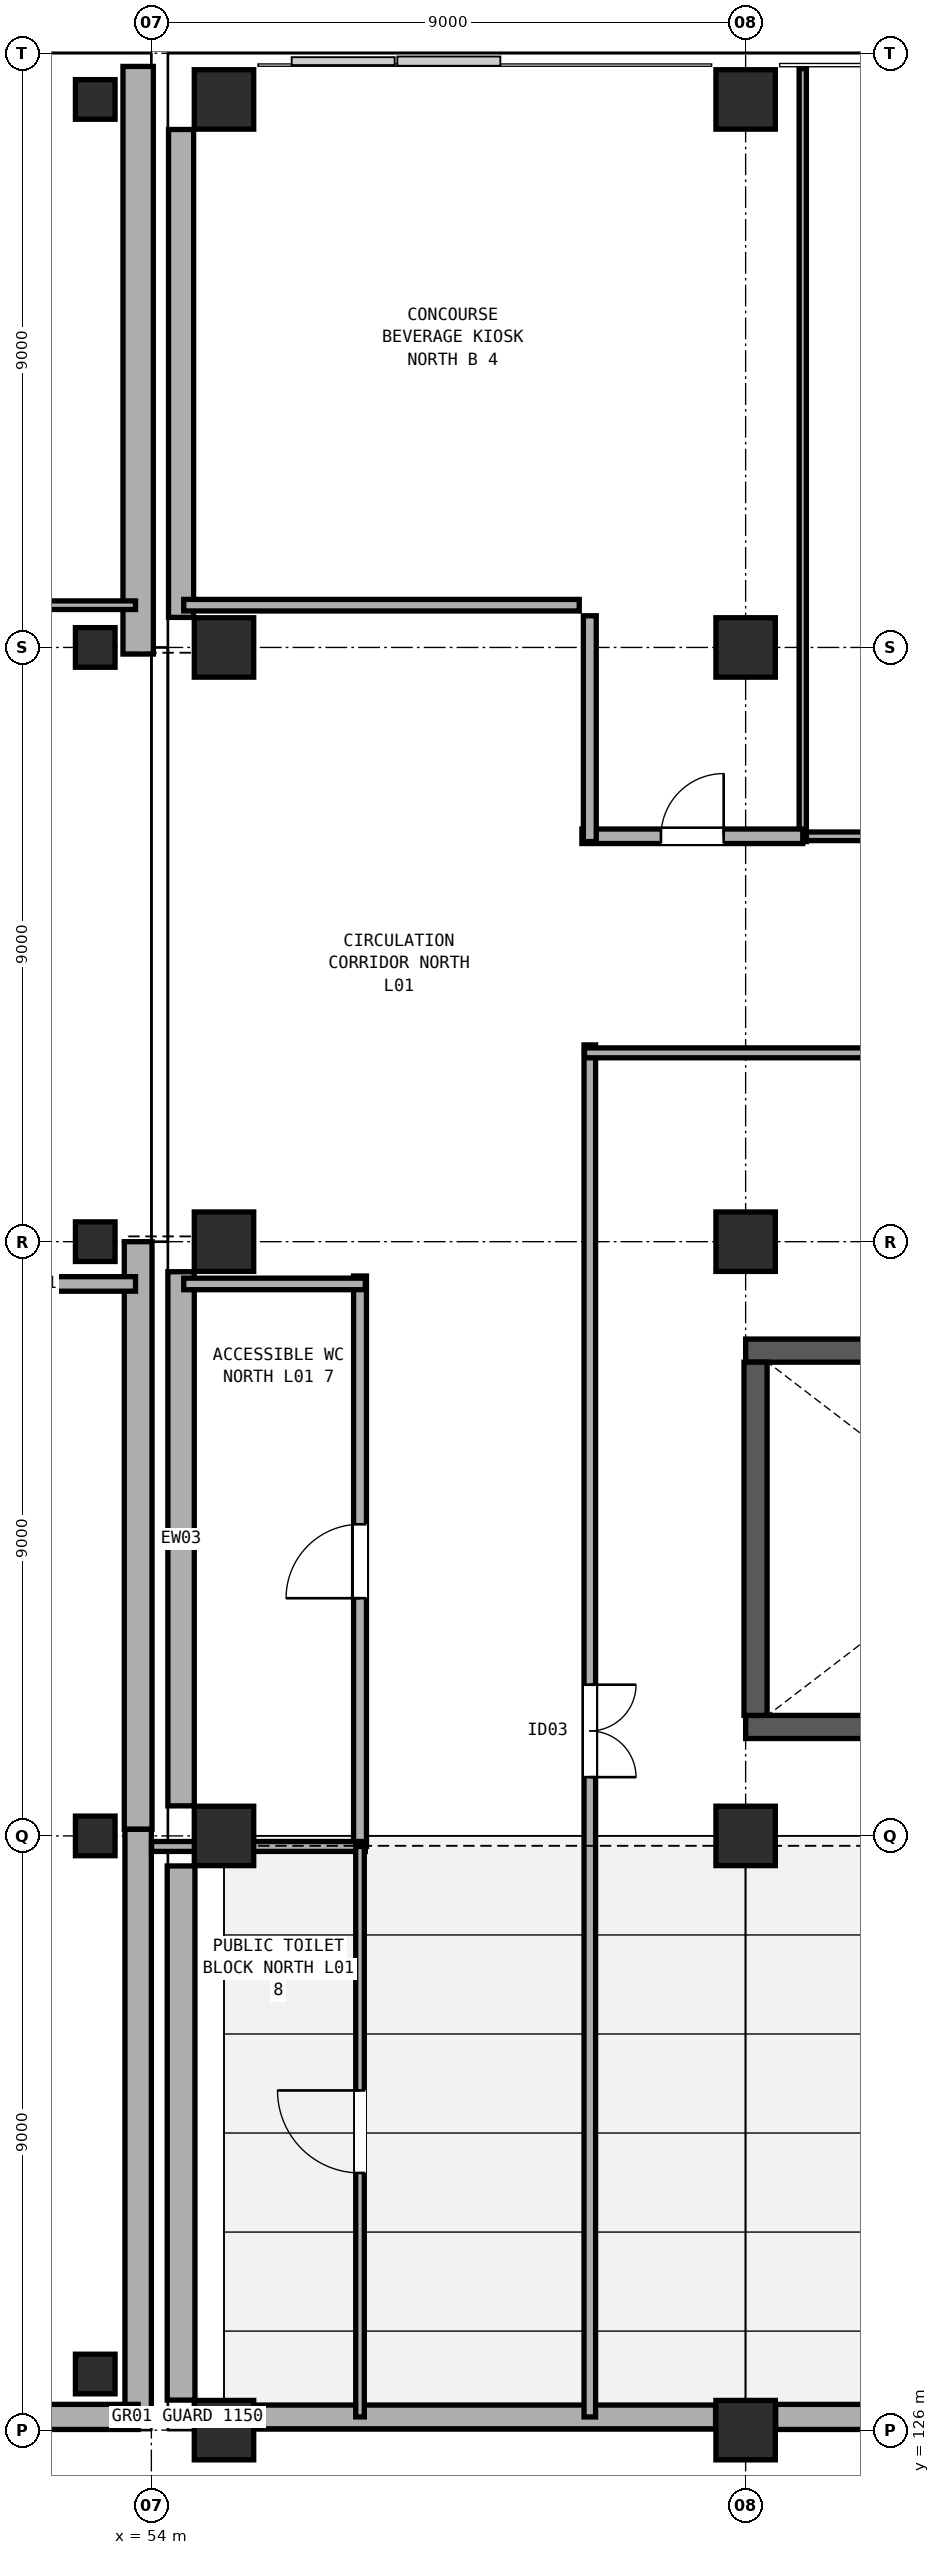
"""IFC4 building model, lengths in metres.
Left out: names, types, materials, properties, quantities, classifications, styles, units other than length and angle.
Written with IfcOpenShell. Run it as: python <this file> out.ifc"""

import sys

from ifc_helpers import new_model, si_unit, direction, frame, frame_2d, origin, origin_2d, place, context, subcontext, project, spatial, rectangle, extrude, element, fill, save


model = new_model("IFC4")
c1 = context("Model", 3, precision=1e-05, world=origin(), true_north=direction((0.0, 1.0)))
c2 = subcontext(c1, "Body", "Model", "MODEL_VIEW")
j1 = project(units=[si_unit("LENGTHUNIT", "METRE"), si_unit("PLANEANGLEUNIT", "RADIAN")], contexts=[c1])
p1 = place(None, origin())
s1 = spatial("IfcSite", under=j1, at=p1, CompositionType="ELEMENT")
p2 = place(p1, origin())
s2 = spatial("IfcBuilding", under=s1, at=p2, CompositionType="ELEMENT")
p3 = place(p2, frame((0.0, 0.0, 4.8)))
s3 = spatial("IfcBuildingStorey", under=s2, at=p3, CompositionType="ELEMENT", Elevation=4.8)
for number, where, z_axis, x_axis in (
    (1, (55.1, 126.0, 0.0), (0.0, 0.0, 1.0), (1.0, 0.0, 0.0)),
    (2, (55.1, 135.0, 0.0), (0.0, 0.0, 1.0), (1.0, 0.0, 0.0)),
    (3, (55.1, 144.0, 0.0), (0.0, 0.0, 1.0), (1.0, 0.0, 0.0)),
    (4, (55.1, 153.0, 0.0), (0.0, 0.0, 1.0), (1.0, 0.0, 0.0)),
    (5, (55.1, 161.3, 0.0), (0.0, 0.0, 1.0), (1.0, 0.0, 0.0)),
    (6, (63.0, 126.0, 0.0), (0.0, 0.0, 1.0), (1.0, 0.0, 0.0)),
    (7, (63.0, 135.0, 0.0), (0.0, 0.0, 1.0), (1.0, 0.0, 0.0)),
    (8, (63.0, 144.0, 0.0), (0.0, 0.0, 1.0), (1.0, 0.0, 0.0)),
    (9, (63.0, 153.0, 0.0), (0.0, 0.0, 1.0), (1.0, 0.0, 0.0)),
    (10, (63.0, 161.3, 0.0), (0.0, 0.0, 1.0), (1.0, 0.0, 0.0)),
):
    element("IfcColumn", number, at=place(p3, frame(where, z_axis=z_axis, x_axis=x_axis)), inside=s3, PredefinedType="COLUMN", context=c2, shape_type="SweptSolid", body=[
        extrude(rectangle(XDim=0.9, YDim=0.9, at=origin_2d()), origin(), (0.0, 0.0, 1.0), 4.8),
    ])
for number, where, z_axis, x_axis in (
    (11, (53.15, 126.85, 0.0), (0.0, 0.0, 1.0), (1.0, 0.0, 0.0)),
    (12, (53.15, 135.0, 0.0), (0.0, 0.0, 1.0), (1.0, 0.0, 0.0)),
    (13, (53.15, 144.0, 0.0), (0.0, 0.0, 1.0), (1.0, 0.0, 0.0)),
    (14, (53.15, 153.0, 0.0), (0.0, 0.0, 1.0), (1.0, 0.0, 0.0)),
    (15, (53.15, 161.3, 0.0), (0.0, 0.0, 1.0), (1.0, 0.0, 0.0)),
):
    element("IfcColumn", number, at=place(p3, frame(where, z_axis=z_axis, x_axis=x_axis)), inside=s3, PredefinedType="COLUMN", context=c2, shape_type="SweptSolid", body=[
        extrude(rectangle(XDim=0.6, YDim=0.6, at=origin_2d()), origin(), (0.0, 0.0, 1.0), 4.8),
    ])
p4 = place(p3, frame((63.0, 136.65, 0.0), z_axis=(0.0, 0.0, 1.0), x_axis=(1.0, 0.0, 0.0)))
e16 = element("IfcWall", 16, at=p4, inside=s3, PredefinedType="SHEAR", context=c2, shape_type="SweptSolid", body=[
    extrude(rectangle(XDim=18.0, YDim=0.35, at=frame_2d((9.0, 0.0))), origin(), (0.0, 0.0, 1.0), 4.52),
])
p5 = place(p3, frame((81.0, 142.35, 0.0), z_axis=(0.0, 0.0, 1.0), x_axis=(-1.0, 0.0, 0.0)))
e17 = element("IfcWall", 17, at=p5, inside=s3, PredefinedType="SHEAR", context=c2, shape_type="SweptSolid", body=[
    extrude(rectangle(XDim=18.0, YDim=0.35, at=frame_2d((9.0, 0.0))), origin(), (0.0, 0.0, 1.0), 4.52),
])
p6 = place(p5, frame((4.7, 0.0, 0.0)))
e18 = element("IfcOpeningElement", 18, at=p6, cuts=e17, PredefinedType="OPENING", context=c2, shape_type="SweptSolid", body=[
    extrude(rectangle(XDim=1.9, YDim=2.25, at=frame_2d((0.95, 1.125))), frame((0.0, 0.185, 0.0), z_axis=(0.0, -1.0, 0.0), x_axis=(1.0, 0.0, 0.0)), (0.0, 0.0, 1.0), 0.37),
])
p7 = place(p3, frame((63.15, 142.175, 0.0), z_axis=(0.0, 0.0, 1.0), x_axis=(0.0, -1.0, 0.0)))
e19 = element("IfcWall", 19, at=p7, inside=s3, PredefinedType="SHEAR", context=c2, shape_type="SweptSolid", body=[
    extrude(rectangle(XDim=5.35, YDim=0.35, at=frame_2d((2.675, 0.0))), origin(), (0.0, 0.0, 1.0), 4.52),
])
p8 = place(p3, frame((54.45, 126.455, 0.0), z_axis=(0.0, 0.0, 1.0), x_axis=(0.0, 1.0, 0.0)))
e20 = element("IfcWall", 20, at=p8, inside=s3, PredefinedType="SOLIDWALL", context=c2, shape_type="SweptSolid", body=[
    extrude(rectangle(XDim=8.09, YDim=0.42, at=frame_2d((4.045, 0.0))), origin(), (0.0, 0.0, 1.0), 3.28),
])
p9 = place(p3, frame((54.45, 135.455, 0.0), z_axis=(0.0, 0.0, 1.0), x_axis=(0.0, 1.0, 0.0)))
e21 = element("IfcWall", 21, at=p9, inside=s3, PredefinedType="SOLIDWALL", context=c2, shape_type="SweptSolid", body=[
    extrude(rectangle(XDim=8.09, YDim=0.4, at=frame_2d((4.045, 0.0))), origin(), (0.0, 0.0, 1.0), 3.28),
])
p10 = place(p3, frame((54.45, 153.455, 0.0), z_axis=(0.0, 0.0, 1.0), x_axis=(0.0, 1.0, 0.0)))
e22 = element("IfcWall", 22, at=p10, inside=s3, PredefinedType="SOLIDWALL", context=c2, shape_type="SweptSolid", body=[
    extrude(rectangle(XDim=7.39, YDim=0.38, at=frame_2d((3.695, 0.0))), origin(), (0.0, 0.0, 1.0), 3.28),
])
p11 = place(p3, frame((71.545, 126.2, 0.0), z_axis=(0.0, 0.0, 1.0), x_axis=(-1.0, 0.0, 0.0)))
e23 = element("IfcWall", 23, at=p11, inside=s3, PredefinedType="SOLIDWALL", context=c2, shape_type="SweptSolid", body=[
    extrude(rectangle(XDim=8.09, YDim=0.38, at=frame_2d((4.045, 0.0))), origin(), (0.0, 0.0, 1.0), 3.28),
])
p12 = place(p3, frame((62.545, 126.2, 0.0), z_axis=(0.0, 0.0, 1.0), x_axis=(-1.0, 0.0, 0.0)))
e24 = element("IfcWall", 24, at=p12, inside=s3, PredefinedType="SOLIDWALL", context=c2, shape_type="SweptSolid", body=[
    extrude(rectangle(XDim=6.99, YDim=0.36, at=frame_2d((3.495, 0.0))), origin(), (0.0, 0.0, 1.0), 3.28),
])
p13 = place(p3, frame((45.305, 161.8, 0.0), z_axis=(0.0, 0.0, 1.0), x_axis=(1.0, 0.0, 0.0)))
e25 = element("IfcWall", 25, at=p13, inside=s3, PredefinedType="SOLIDWALL", context=c2, shape_type="SweptSolid", body=[
    extrude(rectangle(XDim=7.54, YDim=0.34, at=frame_2d((3.77, 0.0))), origin(), (0.0, 0.0, 1.0), 3.28),
])
p14 = place(p3, frame((53.8, 161.8, 0.0), z_axis=(0.0, 0.0, 1.0), x_axis=(0.0, -1.0, 0.0)))
e26 = element("IfcWall", 26, at=p14, inside=s3, PredefinedType="SOLIDWALL", context=c2, shape_type="SweptSolid", body=[
    extrude(rectangle(XDim=8.9, YDim=0.46, at=frame_2d((4.45, 0.0))), origin(), (0.0, 0.0, 1.0), 3.28),
])
p15 = place(p3, frame((53.8, 144.0, 0.0), z_axis=(0.0, 0.0, 1.0), x_axis=(0.0, -1.0, 0.0)))
e27 = element("IfcWall", 27, at=p15, inside=s3, PredefinedType="SOLIDWALL", context=c2, shape_type="SweptSolid", body=[
    extrude(rectangle(XDim=8.9, YDim=0.42, at=frame_2d((4.45, 0.0))), origin(), (0.0, 0.0, 1.0), 3.28),
])
p16 = place(p3, frame((53.8, 135.1, 0.0), z_axis=(0.0, 0.0, 1.0), x_axis=(0.0, -1.0, 0.0)))
e28 = element("IfcWall", 28, at=p16, inside=s3, PredefinedType="SOLIDWALL", context=c2, shape_type="SweptSolid", body=[
    extrude(rectangle(XDim=8.9, YDim=0.4, at=frame_2d((4.45, 0.0))), origin(), (0.0, 0.0, 1.0), 3.28),
])
p17 = place(p3, frame((53.8, 126.2, 0.0), z_axis=(0.0, 0.0, 1.0), x_axis=(-1.0, 0.0, 0.0)))
e29 = element("IfcWall", 29, at=p17, inside=s3, PredefinedType="SOLIDWALL", context=c2, shape_type="SweptSolid", body=[
    extrude(rectangle(XDim=8.933, YDim=0.38, at=frame_2d((4.467, 0.0))), origin(), (0.0, 0.0, 1.0), 3.28),
])
p18 = place(p3, frame((60.64, 146.98, 0.0), z_axis=(0.0, 0.0, 1.0), x_axis=(0.0, -1.0, 0.0)))
e30 = element("IfcWall", 30, at=p18, inside=s3, PredefinedType="PARTITIONING", context=c2, shape_type="SweptSolid", body=[
    extrude(rectangle(XDim=20.78, YDim=0.175, at=frame_2d((10.39, 0.0))), origin(), (0.0, 0.0, 1.0), 3.28),
])
p19 = place(p18, frame((9.69, 0.0, 0.0)))
e31 = element("IfcOpeningElement", 31, at=p19, cuts=e30, PredefinedType="OPENING", context=c2, shape_type="SweptSolid", body=[
    extrude(rectangle(XDim=1.4, YDim=2.15, at=frame_2d((0.7, 1.075))), frame((0.0, 0.097, 0.0), z_axis=(0.0, -1.0, 0.0), x_axis=(1.0, 0.0, 0.0)), (0.0, 0.0, 1.0), 0.195),
])
p20 = place(p3, frame((60.56, 146.86, 0.0), z_axis=(0.0, 0.0, 1.0), x_axis=(1.0, 0.0, 0.0)))
e32 = element("IfcWall", 32, at=p20, inside=s3, PredefinedType="PARTITIONING", context=c2, shape_type="SweptSolid", body=[
    extrude(rectangle(XDim=12.68, YDim=0.15, at=frame_2d((6.34, 0.0))), origin(), (0.0, 0.0, 1.0), 3.28),
])
p21 = place(p3, frame((73.24, 150.14, 0.0), z_axis=(0.0, 0.0, 1.0), x_axis=(-1.0, 0.0, 0.0)))
e33 = element("IfcWall", 33, at=p21, inside=s3, PredefinedType="PARTITIONING", context=c2, shape_type="SweptSolid", body=[
    extrude(rectangle(XDim=9.335, YDim=0.13, at=frame_2d((4.667, 0.0))), origin(), (0.0, 0.0, 1.0), 3.28),
])
p22 = place(p3, frame((63.865, 150.06, 0.0), z_axis=(0.0, 0.0, 1.0), x_axis=(0.0, 1.0, 0.0)))
e34 = element("IfcWall", 34, at=p22, inside=s3, PredefinedType="PARTITIONING", context=c2, shape_type="SweptSolid", body=[
    extrude(rectangle(XDim=11.707, YDim=0.11, at=frame_2d((5.854, 0.0))), origin(), (0.0, 0.0, 1.0), 3.28),
])
p23 = place(p3, frame((60.52, 150.14, 0.0), z_axis=(0.0, 0.0, 1.0), x_axis=(1.0, 0.0, 0.0)))
e35 = element("IfcWall", 35, at=p23, inside=s3, PredefinedType="PARTITIONING", context=c2, shape_type="SweptSolid", body=[
    extrude(rectangle(XDim=3.345, YDim=0.22, at=frame_2d((1.672, 0.0))), origin(), (0.0, 0.0, 1.0), 3.28),
])
p24 = place(p23, frame((1.198, 0.0, 0.0)))
e36 = element("IfcOpeningElement", 36, at=p24, cuts=e35, PredefinedType="OPENING", context=c2, shape_type="SweptSolid", body=[
    extrude(rectangle(XDim=0.95, YDim=2.18, at=frame_2d((0.475, 1.09))), frame((0.0, 0.12, 0.0), z_axis=(0.0, -1.0, 0.0), x_axis=(1.0, 0.0, 0.0)), (0.0, 0.0, 1.0), 0.24),
])
p25 = place(p3, frame((60.64, 150.06, 0.0), z_axis=(0.0, 0.0, 1.0), x_axis=(0.0, 1.0, 0.0)))
e37 = element("IfcWall", 37, at=p25, inside=s3, PredefinedType="PARTITIONING", context=c2, shape_type="SweptSolid", body=[
    extrude(rectangle(XDim=3.42, YDim=0.195, at=frame_2d((1.71, 0.0))), origin(), (0.0, 0.0, 1.0), 3.28),
])
p26 = place(p3, frame((60.48, 153.64, 0.0), z_axis=(0.0, 0.0, 1.0), x_axis=(-1.0, 0.0, 0.0)))
e38 = element("IfcWall", 38, at=p26, inside=s3, PredefinedType="PARTITIONING", context=c2, shape_type="SweptSolid", body=[
    extrude(rectangle(XDim=5.99, YDim=0.175, at=frame_2d((2.995, 0.0))), origin(), (0.0, 0.0, 1.0), 3.28),
])
p27 = place(p3, frame((57.16, 134.84, 0.0), z_axis=(0.0, 0.0, 1.0), x_axis=(0.0, 1.0, 0.0)))
e39 = element("IfcWall", 39, at=p27, inside=s3, PredefinedType="PARTITIONING", context=c2, shape_type="SweptSolid", body=[
    extrude(rectangle(XDim=8.64, YDim=0.195, at=frame_2d((4.32, 0.0))), origin(), (0.0, 0.0, 1.0), 3.28),
])
p28 = place(p27, frame((3.76, 0.0, 0.0)))
e40 = element("IfcOpeningElement", 40, at=p28, cuts=e39, PredefinedType="OPENING", context=c2, shape_type="SweptSolid", body=[
    extrude(rectangle(XDim=1.12, YDim=2.22, at=frame_2d((0.56, 1.11))), frame((0.0, 0.107, 0.0), z_axis=(0.0, -1.0, 0.0), x_axis=(1.0, 0.0, 0.0)), (0.0, 0.0, 1.0), 0.215),
])
p29 = place(p3, frame((54.49, 143.36, 0.0), z_axis=(0.0, 0.0, 1.0), x_axis=(1.0, 0.0, 0.0)))
e41 = element("IfcWall", 41, at=p29, inside=s3, PredefinedType="PARTITIONING", context=c2, shape_type="SweptSolid", body=[
    extrude(rectangle(XDim=2.75, YDim=0.175, at=frame_2d((1.375, 0.0))), origin(), (0.0, 0.0, 1.0), 3.28),
])
p30 = place(p3, frame((57.24, 134.84, 0.0), z_axis=(0.0, 0.0, 1.0), x_axis=(-1.0, 0.0, 0.0)))
e42 = element("IfcWall", 42, at=p30, inside=s3, PredefinedType="PARTITIONING", context=c2, shape_type="SweptSolid", body=[
    extrude(rectangle(XDim=3.237, YDim=0.15, at=frame_2d((1.619, 0.0))), origin(), (0.0, 0.0, 1.0), 3.28),
])
p31 = place(p3, frame((57.16, 126.2, 0.0), z_axis=(0.0, 0.0, 1.0), x_axis=(0.0, 1.0, 0.0)))
e43 = element("IfcWall", 43, at=p31, inside=s3, PredefinedType="PARTITIONING", context=c2, shape_type="SweptSolid", body=[
    extrude(rectangle(XDim=8.64, YDim=0.13, at=frame_2d((4.32, 0.0))), origin(), (0.0, 0.0, 1.0), 3.28),
])
p32 = place(p31, frame((3.695, 0.0, 0.0)))
e44 = element("IfcOpeningElement", 44, at=p32, cuts=e43, PredefinedType="OPENING", context=c2, shape_type="SweptSolid", body=[
    extrude(rectangle(XDim=1.25, YDim=2.15, at=frame_2d((0.625, 1.075))), frame((0.0, 0.075, 0.0), z_axis=(0.0, -1.0, 0.0), x_axis=(1.0, 0.0, 0.0)), (0.0, 0.0, 1.0), 0.15),
])
p33 = place(p3, frame((50.75, 143.36, 0.0), z_axis=(0.0, 0.0, 1.0), x_axis=(1.0, 0.0, 0.0)))
e45 = element("IfcWall", 45, at=p33, inside=s3, PredefinedType="PARTITIONING", context=c2, shape_type="SweptSolid", body=[
    extrude(rectangle(XDim=3.01, YDim=0.22, at=frame_2d((1.505, 0.0))), origin(), (0.0, 0.0, 1.0), 3.28),
])
p34 = place(p3, frame((53.76, 153.64, 0.0), z_axis=(0.0, 0.0, 1.0), x_axis=(-1.0, 0.0, 0.0)))
e46 = element("IfcWall", 46, at=p34, inside=s3, PredefinedType="PARTITIONING", context=c2, shape_type="SweptSolid", body=[
    extrude(rectangle(XDim=3.01, YDim=0.13, at=frame_2d((1.505, 0.0))), origin(), (0.0, 0.0, 1.0), 3.28),
])
p35 = place(p19, origin())
e47 = element("IfcDoor", 47, at=p35, inside=s3, OperationType="DOUBLE_DOOR_SINGLE_SWING", PredefinedType="DOOR", context=c2, shape_type="SweptSolid", body=[
    extrude(rectangle(XDim=1.4, YDim=2.15, at=frame_2d((0.7, 1.075))), frame((0.0, 0.025, 0.0), z_axis=(0.0, -1.0, 0.0), x_axis=(1.0, 0.0, 0.0)), (0.0, 0.0, 1.0), 0.05),
])
fill(e31, e47)
p36 = place(p24, origin())
e48 = element("IfcDoor", 48, at=p36, inside=s3, OperationType="SINGLE_SWING_RIGHT", PredefinedType="DOOR", context=c2, shape_type="SweptSolid", body=[
    extrude(rectangle(XDim=0.95, YDim=2.18, at=frame_2d((0.475, 1.09))), frame((0.0, 0.025, 0.0), z_axis=(0.0, -1.0, 0.0), x_axis=(1.0, 0.0, 0.0)), (0.0, 0.0, 1.0), 0.05),
])
fill(e36, e48)
p37 = place(p28, origin())
e49 = element("IfcDoor", 49, at=p37, inside=s3, OperationType="SINGLE_SWING_LEFT", PredefinedType="DOOR", context=c2, shape_type="SweptSolid", body=[
    extrude(rectangle(XDim=1.12, YDim=2.22, at=frame_2d((0.56, 1.11))), frame((0.0, 0.025, 0.0), z_axis=(0.0, -1.0, 0.0), x_axis=(1.0, 0.0, 0.0)), (0.0, 0.0, 1.0), 0.05),
])
fill(e40, e49)
p38 = place(p32, origin())
e50 = element("IfcDoor", 50, at=p38, inside=s3, OperationType="SINGLE_SWING_RIGHT", PredefinedType="DOOR", context=c2, shape_type="SweptSolid", body=[
    extrude(rectangle(XDim=1.25, YDim=2.15, at=frame_2d((0.625, 1.075))), frame((0.0, 0.025, 0.0), z_axis=(0.0, -1.0, 0.0), x_axis=(1.0, 0.0, 0.0)), (0.0, 0.0, 1.0), 0.05),
])
fill(e44, e50)
save(model, sys.argv[1])
